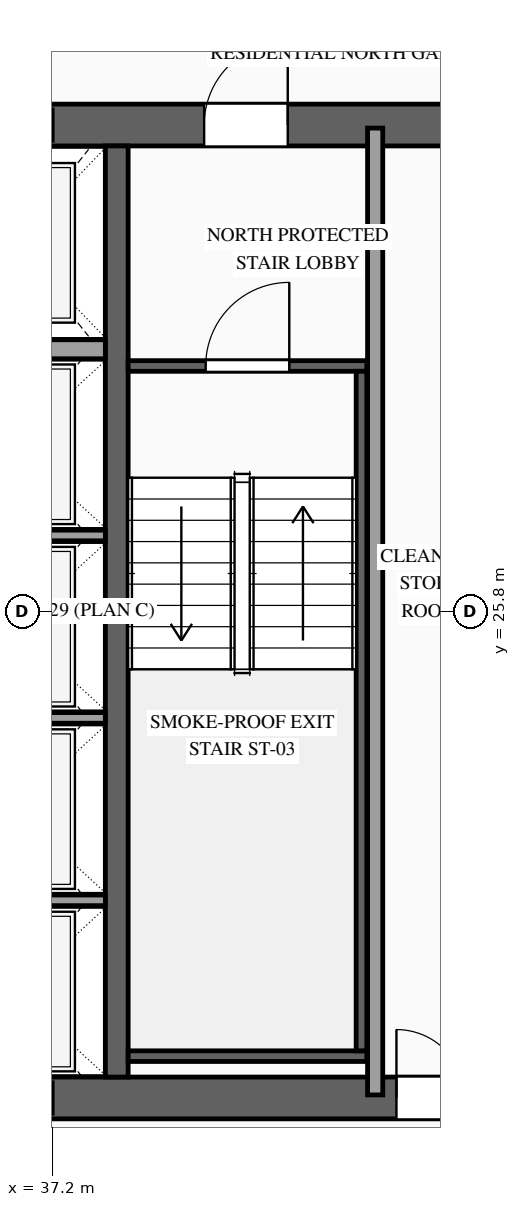
"""IFC4 building model, lengths in metres.
Left out: names, types, materials, properties, quantities, classifications, styles, units other than length and angle.
Written with IfcOpenShell. Run it as: python <this file> out.ifc"""

import sys

from ifc_helpers import new_model, si_unit, direction, frame, frame_2d, origin, place, context, subcontext, project, spatial, rectangle, extrude, source, transform, mapped, element, fill, save


model = new_model("IFC4")
c1 = context("Model", 3, precision=1e-05, world=origin(), true_north=direction((0.0, 1.0)))
c2 = subcontext(c1, "Body", "Model", "MODEL_VIEW")
j1 = project(units=[si_unit("LENGTHUNIT", "METRE"), si_unit("PLANEANGLEUNIT", "RADIAN")], contexts=[c1])
p1 = place(None, origin())
s1 = spatial("IfcSite", under=j1, at=p1, CompositionType="ELEMENT")
p2 = place(p1, origin())
s2 = spatial("IfcBuilding", under=s1, at=p2, CompositionType="ELEMENT")
p3 = place(p2, frame((0.0, 0.0, 227.6)))
s3 = spatial("IfcBuildingStorey", under=s2, at=p3, CompositionType="ELEMENT", Elevation=227.6)
p4 = place(p3, frame((23.525, 19.4, 0.0), z_axis=(0.0, 0.0, 1.0), x_axis=(1.0, 0.0, 0.0)))
e1 = element("IfcWall", 1, at=p4, inside=s3, PredefinedType="SHEAR", context=c2, shape_type="SweptSolid", body=[
    extrude(rectangle(XDim=26.95, YDim=0.55, at=frame_2d((13.475, 0.0))), origin(), (0.0, 0.0, 1.0), 3.5),
])
p5 = place(p4, frame((1.925, 0.0, 0.0)))
e2 = element("IfcOpeningElement", 2, at=p5, cuts=e1, PredefinedType="OPENING", context=c2, shape_type="SweptSolid", body=[
    extrude(rectangle(XDim=1.1, YDim=2.2, at=frame_2d((0.55, 1.1))), frame((0.0, 0.29, 0.0), z_axis=(0.0, -1.0, 0.0), x_axis=(1.0, 0.0, 0.0)), (0.0, 0.0, 1.0), 0.58),
])
p6 = place(p4, frame((9.825, 0.0, 0.0)))
e3 = element("IfcOpeningElement", 3, at=p6, cuts=e1, PredefinedType="OPENING", context=c2, shape_type="SweptSolid", body=[
    extrude(rectangle(XDim=1.1, YDim=2.2, at=frame_2d((0.55, 1.1))), frame((0.0, 0.29, 0.0), z_axis=(0.0, -1.0, 0.0), x_axis=(1.0, 0.0, 0.0)), (0.0, 0.0, 1.0), 0.58),
])
p7 = place(p4, frame((23.025, 0.0, 0.0)))
e4 = element("IfcOpeningElement", 4, at=p7, cuts=e1, PredefinedType="OPENING", context=c2, shape_type="SweptSolid", body=[
    extrude(rectangle(XDim=1.1, YDim=2.2, at=frame_2d((0.55, 1.1))), frame((0.0, 0.29, 0.0), z_axis=(0.0, -1.0, 0.0), x_axis=(1.0, 0.0, 0.0)), (0.0, 0.0, 1.0), 0.58),
])
p8 = place(p4, frame((19.645, 0.0, 0.0)))
e5 = element("IfcOpeningElement", 5, at=p8, cuts=e1, PredefinedType="OPENING", context=c2, shape_type="SweptSolid", body=[
    extrude(rectangle(XDim=0.9, YDim=2.15, at=frame_2d((0.45, 1.075))), frame((0.0, 0.29, 0.0), z_axis=(0.0, -1.0, 0.0), x_axis=(1.0, 0.0, 0.0)), (0.0, 0.0, 1.0), 0.58),
])
p9 = place(p4, frame((18.205, 0.0, 0.0)))
e6 = element("IfcOpeningElement", 6, at=p9, cuts=e1, PredefinedType="OPENING", context=c2, shape_type="SweptSolid", body=[
    extrude(rectangle(XDim=0.9, YDim=2.15, at=frame_2d((0.45, 1.075))), frame((0.0, 0.29, 0.0), z_axis=(0.0, -1.0, 0.0), x_axis=(1.0, 0.0, 0.0)), (0.0, 0.0, 1.0), 0.58),
])
p10 = place(p3, frame((23.525, 32.2, 0.0), z_axis=(0.0, 0.0, 1.0), x_axis=(1.0, 0.0, 0.0)))
e7 = element("IfcWall", 7, at=p10, inside=s3, PredefinedType="SHEAR", context=c2, shape_type="SweptSolid", body=[
    extrude(rectangle(XDim=26.95, YDim=0.55, at=frame_2d((13.475, 0.0))), origin(), (0.0, 0.0, 1.0), 3.5),
])
p11 = place(p10, frame((4.545, 0.0, 0.0)))
e8 = element("IfcOpeningElement", 8, at=p11, cuts=e7, PredefinedType="OPENING", context=c2, shape_type="SweptSolid", body=[
    extrude(rectangle(XDim=0.9, YDim=2.15, at=frame_2d((0.45, 1.075))), frame((0.0, 0.29, 0.0), z_axis=(0.0, -1.0, 0.0), x_axis=(1.0, 0.0, 0.0)), (0.0, 0.0, 1.0), 0.58),
])
p12 = place(p10, frame((9.825, 0.0, 0.0)))
e9 = element("IfcOpeningElement", 9, at=p12, cuts=e7, PredefinedType="OPENING", context=c2, shape_type="SweptSolid", body=[
    extrude(rectangle(XDim=1.1, YDim=2.2, at=frame_2d((0.55, 1.1))), frame((0.0, 0.29, 0.0), z_axis=(0.0, -1.0, 0.0), x_axis=(1.0, 0.0, 0.0)), (0.0, 0.0, 1.0), 0.58),
])
p13 = place(p10, frame((15.675, 0.0, 0.0)))
e10 = element("IfcOpeningElement", 10, at=p13, cuts=e7, PredefinedType="OPENING", context=c2, shape_type="SweptSolid", body=[
    extrude(rectangle(XDim=1.1, YDim=2.2, at=frame_2d((0.55, 1.1))), frame((0.0, 0.29, 0.0), z_axis=(0.0, -1.0, 0.0), x_axis=(1.0, 0.0, 0.0)), (0.0, 0.0, 1.0), 0.58),
])
p14 = place(p10, frame((19.645, 0.0, 0.0)))
e11 = element("IfcOpeningElement", 11, at=p14, cuts=e7, PredefinedType="OPENING", context=c2, shape_type="SweptSolid", body=[
    extrude(rectangle(XDim=0.9, YDim=2.15, at=frame_2d((0.45, 1.075))), frame((0.0, 0.29, 0.0), z_axis=(0.0, -1.0, 0.0), x_axis=(1.0, 0.0, 0.0)), (0.0, 0.0, 1.0), 0.58),
])
m1 = source(origin(), c2, "Body", "SweptSolid", [
    extrude(rectangle(XDim=12.25, YDim=0.3, at=frame_2d((6.125, 0.0))), origin(), (0.0, 0.0, 1.0), 3.5),
])
p15 = place(p3, frame((38.05, 19.675, 0.0), z_axis=(0.0, 0.0, 1.0), x_axis=(0.0, 1.0, 0.0)))
e12 = element("IfcWall", 12, at=p15, inside=s3, PredefinedType="SOLIDWALL", context=c2, shape_type="MappedRepresentation", body=[
    mapped(m1, transform((0.0, 0.0, 0.0), scale=1.0)),
])
m2 = source(origin(), c2, "Body", "SweptSolid", [
    extrude(rectangle(XDim=2.4, YDim=0.14, at=frame_2d((1.2, 0.0))), origin(), (0.0, 0.0, 1.0), 3.28),
])
for number, where, z_axis, x_axis in (
    (13, (35.5, 22.0, 0.0), (0.0, 0.0, 1.0), (1.0, 0.0, 0.0)),
    (14, (35.5, 24.4, 0.0), (0.0, 0.0, 1.0), (1.0, 0.0, 0.0)),
    (15, (35.5, 26.8, 0.0), (0.0, 0.0, 1.0), (1.0, 0.0, 0.0)),
):
    element("IfcWall", number, at=place(p3, frame(where, z_axis=z_axis, x_axis=x_axis)), inside=s3, PredefinedType="SOLIDWALL", context=c2, shape_type="MappedRepresentation", body=[
        mapped(m2, transform((0.0, 0.0, 0.0), scale=1.0)),
    ])
m3 = source(origin(), c2, "Body", "SweptSolid", [
    extrude(rectangle(XDim=2.4, YDim=0.25, at=frame_2d((1.2, 0.0))), origin(), (0.0, 0.0, 1.0), 3.28),
])
p16 = place(p3, frame((35.5, 29.25, 0.0), z_axis=(0.0, 0.0, 1.0), x_axis=(1.0, 0.0, 0.0)))
e16 = element("IfcWall", 16, at=p16, inside=s3, PredefinedType="SOLIDWALL", context=c2, shape_type="MappedRepresentation", body=[
    mapped(m3, transform((0.0, 0.0, 0.0), scale=1.0)),
])
p17 = place(p3, frame((38.2, 29.03, 0.0), z_axis=(0.0, 0.0, 1.0), x_axis=(1.0, 0.0, 0.0)))
e17 = element("IfcWall", 17, at=p17, inside=s3, PredefinedType="SOLIDWALL", context=c2, shape_type="SweptSolid", body=[
    extrude(rectangle(XDim=3.14, YDim=0.14, at=frame_2d((1.57, 0.0))), origin(), (0.0, 0.0, 1.0), 3.28),
])
p18 = place(p17, frame((1.02, 0.0, 0.0)))
e18 = element("IfcOpeningElement", 18, at=p18, cuts=e17, PredefinedType="OPENING", context=c2, shape_type="SweptSolid", body=[
    extrude(rectangle(XDim=1.1, YDim=2.2, at=frame_2d((0.55, 1.1))), frame((0.0, 0.085, 0.0), z_axis=(0.0, -1.0, 0.0), x_axis=(1.0, 0.0, 0.0)), (0.0, 0.0, 1.0), 0.17),
])
m4 = source(origin(), c2, "Body", "SweptSolid", [
    extrude(rectangle(XDim=3.14, YDim=0.14, at=frame_2d((1.57, 0.0))), origin(), (0.0, 0.0, 1.0), 3.28),
])
p19 = place(p3, frame((38.2, 19.95, 0.0), z_axis=(0.0, 0.0, 1.0), x_axis=(1.0, 0.0, 0.0)))
e19 = element("IfcWall", 19, at=p19, inside=s3, PredefinedType="SOLIDWALL", context=c2, shape_type="MappedRepresentation", body=[
    mapped(m4, transform((0.0, 0.0, 0.0), scale=1.0)),
])
m5 = source(origin(), c2, "Body", "SweptSolid", [
    extrude(rectangle(XDim=8.94, YDim=0.14, at=frame_2d((4.47, 0.0))), origin(), (0.0, 0.0, 1.0), 3.28),
])
p20 = place(p3, frame((41.27, 20.02, 0.0), z_axis=(0.0, 0.0, 1.0), x_axis=(0.0, 1.0, 0.0)))
e20 = element("IfcWall", 20, at=p20, inside=s3, PredefinedType="SOLIDWALL", context=c2, shape_type="MappedRepresentation", body=[
    mapped(m5, transform((0.0, 0.0, 0.0), scale=1.0)),
])
m6 = source(origin(), c2, "Body", "SweptSolid", [
    extrude(rectangle(XDim=12.72, YDim=0.2, at=frame_2d((6.36, 0.0))), origin(), (0.0, 0.0, 1.0), 3.28),
])
p21 = place(p3, frame((41.45, 19.44, 0.0), z_axis=(0.0, 0.0, 1.0), x_axis=(0.0, 1.0, 0.0)))
e21 = element("IfcWall", 21, at=p21, inside=s3, PredefinedType="PARTITIONING", context=c2, shape_type="MappedRepresentation", body=[
    mapped(m6, transform((0.0, 0.0, 0.0), scale=1.0)),
])
m7 = source(origin(), c2, "Body", "SweptSolid", [
    extrude(rectangle(XDim=1.1, YDim=2.2, at=frame_2d((0.55, 1.1))), frame((0.0, 0.025, 0.0), z_axis=(0.0, -1.0, 0.0), x_axis=(1.0, 0.0, 0.0)), (0.0, 0.0, 1.0), 0.05),
])
p22 = place(p18, origin())
e22 = element("IfcDoor", 22, at=p22, inside=s3, OperationType="SINGLE_SWING_RIGHT", PredefinedType="DOOR", context=c2, shape_type="MappedRepresentation", body=[
    mapped(m7, transform((0.0, 0.0, 0.0), scale=1.0)),
])
fill(e18, e22)
p23 = place(p13, origin())
e23 = element("IfcDoor", 23, at=p23, inside=s3, OperationType="SINGLE_SWING_RIGHT", PredefinedType="DOOR", context=c2, shape_type="MappedRepresentation", body=[
    mapped(m7, transform((0.0, 0.0, 0.0), scale=1.0)),
])
fill(e10, e23)
m8 = source(origin(), c2, "Body", "SweptSolid", [
    extrude(rectangle(XDim=0.9, YDim=2.15, at=frame_2d((0.45, 1.075))), frame((0.0, 0.025, 0.0), z_axis=(0.0, -1.0, 0.0), x_axis=(1.0, 0.0, 0.0)), (0.0, 0.0, 1.0), 0.05),
])
p24 = place(p9, origin())
e24 = element("IfcDoor", 24, at=p24, inside=s3, OperationType="SINGLE_SWING_LEFT", PredefinedType="DOOR", context=c2, shape_type="MappedRepresentation", body=[
    mapped(m8, transform((0.0, 0.0, 0.0), scale=1.0)),
])
fill(e6, e24)
save(model, sys.argv[1])
